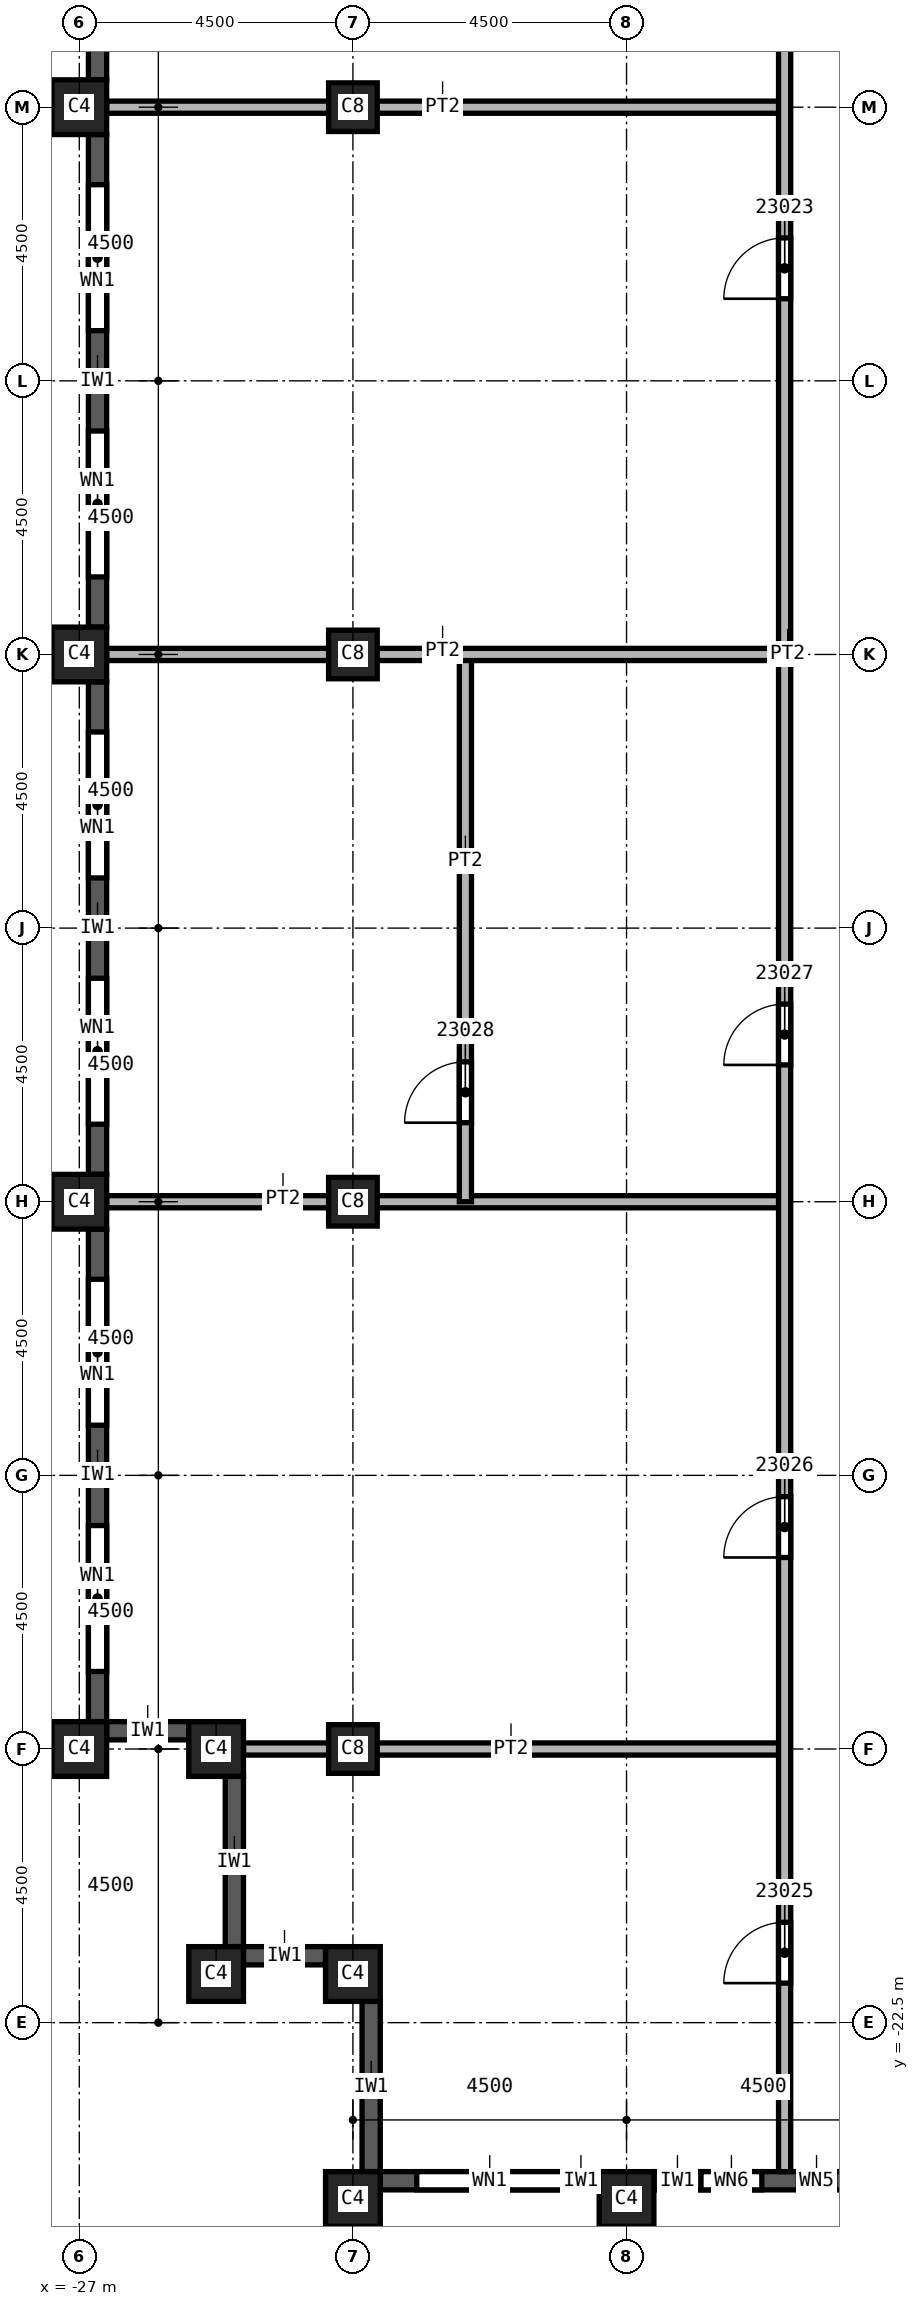
"""IFC4 building model, lengths in metres.
Left out: names, types, materials, properties, quantities, classifications, styles, units other than length and angle.
Written with IfcOpenShell. Run it as: python <this file> out.ifc"""

import sys

from ifc_helpers import new_model, si_unit, direction, frame, frame_2d, origin, origin_2d, place, context, subcontext, project, spatial, rectangle, extrude, element, fill, save


model = new_model("IFC4")
c1 = context("Model", 3, precision=1e-05, world=origin(), true_north=direction((0.0, 1.0)))
c2 = subcontext(c1, "Body", "Model", "MODEL_VIEW")
j1 = project(units=[si_unit("LENGTHUNIT", "METRE"), si_unit("PLANEANGLEUNIT", "RADIAN")], contexts=[c1])
p1 = place(None, origin())
s1 = spatial("IfcSite", under=j1, at=p1, CompositionType="ELEMENT")
p2 = place(p1, origin())
s2 = spatial("IfcBuilding", under=s1, at=p2, CompositionType="ELEMENT")
p3 = place(p2, frame((0.0, 0.0, 330.0)))
s3 = spatial("IfcBuildingStorey", under=s2, at=p3, CompositionType="ELEMENT", Elevation=330.0)
for number, where, z_axis, x_axis in (
    (1, (-22.5, 0.0, 0.0), (0.0, 0.0, 1.0), (1.0, 0.0, 0.0)),
    (2, (-22.5, 9.0, 0.0), (0.0, 0.0, 1.0), (1.0, 0.0, 0.0)),
    (3, (-22.5, -9.0, 0.0), (0.0, 0.0, 1.0), (1.0, 0.0, 0.0)),
    (4, (-22.5, -18.0, 0.0), (0.0, 0.0, 1.0), (1.0, 0.0, 0.0)),
):
    element("IfcColumn", number, at=place(p3, frame(where, z_axis=z_axis, x_axis=x_axis)), inside=s3, PredefinedType="COLUMN", context=c2, shape_type="SweptSolid", body=[
        extrude(rectangle(XDim=0.8, YDim=0.8, at=origin_2d()), origin(), (0.0, 0.0, 1.0), 3.74),
    ])
for number, where, z_axis, x_axis in (
    (5, (-18.0, -25.4, 0.0), (0.0, 0.0, 1.0), (1.0, 0.0, 0.0)),
    (6, (-22.5, -25.4, 0.0), (0.0, 0.0, 1.0), (1.0, 0.0, 0.0)),
    (7, (-27.0, 0.0, 0.0), (0.0, 0.0, 1.0), (0.0, 1.0, 0.0)),
    (8, (-27.0, 9.0, 0.0), (0.0, 0.0, 1.0), (0.0, 1.0, 0.0)),
    (9, (-27.0, -9.0, 0.0), (0.0, 0.0, 1.0), (0.0, 1.0, 0.0)),
    (10, (-27.0, -18.0, 0.0), (0.0, 0.0, 1.0), (0.0, 1.0, 0.0)),
    (11, (-22.5, -21.7, 0.0), (0.0, 0.0, 1.0), (1.0, 0.0, 0.0)),
    (12, (-24.75, -21.7, 0.0), (0.0, 0.0, 1.0), (1.0, 0.0, 0.0)),
    (13, (-24.75, -18.0, 0.0), (0.0, 0.0, 1.0), (1.0, 0.0, 0.0)),
):
    element("IfcColumn", number, at=place(p3, frame(where, z_axis=z_axis, x_axis=x_axis)), inside=s3, PredefinedType="COLUMN", context=c2, shape_type="SweptSolid", body=[
        extrude(rectangle(XDim=0.9, YDim=0.9, at=origin_2d()), origin(), (0.0, 0.0, 1.0), 3.74),
    ])
p4 = place(p3, frame((-26.7, 17.55, 0.0), z_axis=(0.0, 0.0, 1.0), x_axis=(0.0, -1.0, 0.0)))
e14 = element("IfcWall", 14, at=p4, inside=s3, PredefinedType="SOLIDWALL", context=c2, shape_type="SweptSolid", body=[
    extrude(rectangle(XDim=8.1, YDim=0.3, at=frame_2d((4.05, 0.0))), origin(), (0.0, 0.0, 1.0), 3.14),
])
p5 = place(p4, frame((0.825, 0.0, 0.8)))
e15 = element("IfcOpeningElement", 15, at=p5, cuts=e14, PredefinedType="OPENING", context=c2, shape_type="SweptSolid", body=[
    extrude(rectangle(XDim=2.4, YDim=1.95, at=frame_2d((1.2, 0.975))), frame((0.0, 0.15, 0.0), z_axis=(0.0, -1.0, 0.0), x_axis=(1.0, 0.0, 0.0)), (0.0, 0.0, 1.0), 0.3),
])
p6 = place(p4, frame((4.875, 0.0, 0.8)))
e16 = element("IfcOpeningElement", 16, at=p6, cuts=e14, PredefinedType="OPENING", context=c2, shape_type="SweptSolid", body=[
    extrude(rectangle(XDim=2.4, YDim=1.95, at=frame_2d((1.2, 0.975))), frame((0.0, 0.15, 0.0), z_axis=(0.0, -1.0, 0.0), x_axis=(1.0, 0.0, 0.0)), (0.0, 0.0, 1.0), 0.3),
])
p7 = place(p3, frame((-26.7, 8.55, 0.0), z_axis=(0.0, 0.0, 1.0), x_axis=(0.0, -1.0, 0.0)))
e17 = element("IfcWall", 17, at=p7, inside=s3, PredefinedType="SOLIDWALL", context=c2, shape_type="SweptSolid", body=[
    extrude(rectangle(XDim=8.1, YDim=0.3, at=frame_2d((4.05, 0.0))), origin(), (0.0, 0.0, 1.0), 3.14),
])
p8 = place(p7, frame((0.825, 0.0, 0.8)))
e18 = element("IfcOpeningElement", 18, at=p8, cuts=e17, PredefinedType="OPENING", context=c2, shape_type="SweptSolid", body=[
    extrude(rectangle(XDim=2.4, YDim=1.95, at=frame_2d((1.2, 0.975))), frame((0.0, 0.15, 0.0), z_axis=(0.0, -1.0, 0.0), x_axis=(1.0, 0.0, 0.0)), (0.0, 0.0, 1.0), 0.3),
])
p9 = place(p7, frame((4.875, 0.0, 0.8)))
e19 = element("IfcOpeningElement", 19, at=p9, cuts=e17, PredefinedType="OPENING", context=c2, shape_type="SweptSolid", body=[
    extrude(rectangle(XDim=2.4, YDim=1.95, at=frame_2d((1.2, 0.975))), frame((0.0, 0.15, 0.0), z_axis=(0.0, -1.0, 0.0), x_axis=(1.0, 0.0, 0.0)), (0.0, 0.0, 1.0), 0.3),
])
p10 = place(p3, frame((-26.7, -0.45, 0.0), z_axis=(0.0, 0.0, 1.0), x_axis=(0.0, -1.0, 0.0)))
e20 = element("IfcWall", 20, at=p10, inside=s3, PredefinedType="SOLIDWALL", context=c2, shape_type="SweptSolid", body=[
    extrude(rectangle(XDim=8.1, YDim=0.3, at=frame_2d((4.05, 0.0))), origin(), (0.0, 0.0, 1.0), 3.14),
])
p11 = place(p10, frame((0.825, 0.0, 0.8)))
e21 = element("IfcOpeningElement", 21, at=p11, cuts=e20, PredefinedType="OPENING", context=c2, shape_type="SweptSolid", body=[
    extrude(rectangle(XDim=2.4, YDim=1.95, at=frame_2d((1.2, 0.975))), frame((0.0, 0.15, 0.0), z_axis=(0.0, -1.0, 0.0), x_axis=(1.0, 0.0, 0.0)), (0.0, 0.0, 1.0), 0.3),
])
p12 = place(p10, frame((4.875, 0.0, 0.8)))
e22 = element("IfcOpeningElement", 22, at=p12, cuts=e20, PredefinedType="OPENING", context=c2, shape_type="SweptSolid", body=[
    extrude(rectangle(XDim=2.4, YDim=1.95, at=frame_2d((1.2, 0.975))), frame((0.0, 0.15, 0.0), z_axis=(0.0, -1.0, 0.0), x_axis=(1.0, 0.0, 0.0)), (0.0, 0.0, 1.0), 0.3),
])
p13 = place(p3, frame((-26.7, -9.45, 0.0), z_axis=(0.0, 0.0, 1.0), x_axis=(0.0, -1.0, 0.0)))
e23 = element("IfcWall", 23, at=p13, inside=s3, PredefinedType="SOLIDWALL", context=c2, shape_type="SweptSolid", body=[
    extrude(rectangle(XDim=8.1, YDim=0.3, at=frame_2d((4.05, 0.0))), origin(), (0.0, 0.0, 1.0), 3.14),
])
p14 = place(p13, frame((0.825, 0.0, 0.8)))
e24 = element("IfcOpeningElement", 24, at=p14, cuts=e23, PredefinedType="OPENING", context=c2, shape_type="SweptSolid", body=[
    extrude(rectangle(XDim=2.4, YDim=1.95, at=frame_2d((1.2, 0.975))), frame((0.0, 0.15, 0.0), z_axis=(0.0, -1.0, 0.0), x_axis=(1.0, 0.0, 0.0)), (0.0, 0.0, 1.0), 0.3),
])
p15 = place(p13, frame((4.875, 0.0, 0.8)))
e25 = element("IfcOpeningElement", 25, at=p15, cuts=e23, PredefinedType="OPENING", context=c2, shape_type="SweptSolid", body=[
    extrude(rectangle(XDim=2.4, YDim=1.95, at=frame_2d((1.2, 0.975))), frame((0.0, 0.15, 0.0), z_axis=(0.0, -1.0, 0.0), x_axis=(1.0, 0.0, 0.0)), (0.0, 0.0, 1.0), 0.3),
])
p16 = place(p3, frame((-26.55, -17.7, 0.0), z_axis=(0.0, 0.0, 1.0), x_axis=(1.0, 0.0, 0.0)))
e26 = element("IfcWall", 26, at=p16, inside=s3, PredefinedType="SOLIDWALL", context=c2, shape_type="SweptSolid", body=[
    extrude(rectangle(XDim=1.35, YDim=0.3, at=frame_2d((0.675, 0.0))), origin(), (0.0, 0.0, 1.0), 3.14),
])
p17 = place(p3, frame((-24.45, -18.45, 0.0), z_axis=(0.0, 0.0, 1.0), x_axis=(0.0, -1.0, 0.0)))
e27 = element("IfcWall", 27, at=p17, inside=s3, PredefinedType="SOLIDWALL", context=c2, shape_type="SweptSolid", body=[
    extrude(rectangle(XDim=2.8, YDim=0.3, at=frame_2d((1.4, 0.0))), origin(), (0.0, 0.0, 1.0), 3.14),
])
p18 = place(p3, frame((-24.3, -21.4, 0.0), z_axis=(0.0, 0.0, 1.0), x_axis=(1.0, 0.0, 0.0)))
e28 = element("IfcWall", 28, at=p18, inside=s3, PredefinedType="SOLIDWALL", context=c2, shape_type="SweptSolid", body=[
    extrude(rectangle(XDim=1.35, YDim=0.3, at=frame_2d((0.675, 0.0))), origin(), (0.0, 0.0, 1.0), 3.14),
])
p19 = place(p3, frame((-22.2, -22.15, 0.0), z_axis=(0.0, 0.0, 1.0), x_axis=(0.0, -1.0, 0.0)))
e29 = element("IfcWall", 29, at=p19, inside=s3, PredefinedType="SOLIDWALL", context=c2, shape_type="SweptSolid", body=[
    extrude(rectangle(XDim=2.8, YDim=0.3, at=frame_2d((1.4, 0.0))), origin(), (0.0, 0.0, 1.0), 3.14),
])
p20 = place(p3, frame((-22.05, -25.1, 0.0), z_axis=(0.0, 0.0, 1.0), x_axis=(1.0, 0.0, 0.0)))
e30 = element("IfcWall", 30, at=p20, inside=s3, PredefinedType="SOLIDWALL", context=c2, shape_type="SweptSolid", body=[
    extrude(rectangle(XDim=3.6, YDim=0.3, at=frame_2d((1.8, 0.0))), origin(), (0.0, 0.0, 1.0), 3.14),
])
p21 = place(p20, frame((0.6, 0.0, 0.8)))
e31 = element("IfcOpeningElement", 31, at=p21, cuts=e30, PredefinedType="OPENING", context=c2, shape_type="SweptSolid", body=[
    extrude(rectangle(XDim=2.4, YDim=1.95, at=frame_2d((1.2, 0.975))), frame((0.0, 0.15, 0.0), z_axis=(0.0, -1.0, 0.0), x_axis=(1.0, 0.0, 0.0)), (0.0, 0.0, 1.0), 0.3),
])
p22 = place(p3, frame((-17.55, -25.1, 0.0), z_axis=(0.0, 0.0, 1.0), x_axis=(1.0, 0.0, 0.0)))
e32 = element("IfcWall", 32, at=p22, inside=s3, PredefinedType="SOLIDWALL", context=c2, shape_type="SweptSolid", body=[
    extrude(rectangle(XDim=3.6, YDim=0.3, at=frame_2d((1.8, 0.0))), origin(), (0.0, 0.0, 1.0), 3.14),
])
p23 = place(p22, frame((0.775, 0.0, 0.8)))
e33 = element("IfcOpeningElement", 33, at=p23, cuts=e32, PredefinedType="OPENING", context=c2, shape_type="SweptSolid", body=[
    extrude(rectangle(XDim=1.0, YDim=1.95, at=frame_2d((0.5, 0.975))), frame((0.0, 0.15, 0.0), z_axis=(0.0, -1.0, 0.0), x_axis=(1.0, 0.0, 0.0)), (0.0, 0.0, 1.0), 0.3),
])
p24 = place(p22, frame((2.375, 0.0, 0.8)))
e34 = element("IfcOpeningElement", 34, at=p24, cuts=e32, PredefinedType="OPENING", context=c2, shape_type="SweptSolid", body=[
    extrude(rectangle(XDim=0.6, YDim=1.95, at=frame_2d((0.3, 0.975))), frame((0.0, 0.15, 0.0), z_axis=(0.0, -1.0, 0.0), x_axis=(1.0, 0.0, 0.0)), (0.0, 0.0, 1.0), 0.3),
])
for number, where, z_axis, x_axis in (
    (35, (-26.55, -9.0, 0.0), (0.0, 0.0, 1.0), (1.0, 0.0, 0.0)),
    (36, (-26.55, 9.0, 0.0), (0.0, 0.0, 1.0), (1.0, 0.0, 0.0)),
):
    element("IfcWall", number, at=place(p3, frame(where, z_axis=z_axis, x_axis=x_axis)), inside=s3, PredefinedType="PARTITIONING", context=c2, shape_type="SweptSolid", body=[
        extrude(rectangle(XDim=11.15, YDim=0.2, at=frame_2d((5.575, 0.0))), origin(), (0.0, 0.0, 1.0), 3.74),
    ])
p25 = place(p3, frame((-24.3, -18.0, 0.0), z_axis=(0.0, 0.0, 1.0), x_axis=(1.0, 0.0, 0.0)))
e37 = element("IfcWall", 37, at=p25, inside=s3, PredefinedType="PARTITIONING", context=c2, shape_type="SweptSolid", body=[
    extrude(rectangle(XDim=8.9, YDim=0.2, at=frame_2d((4.45, 0.0))), origin(), (0.0, 0.0, 1.0), 3.74),
])
p26 = place(p3, frame((-20.65, -9.0, 0.0), z_axis=(0.0, 0.0, 1.0), x_axis=(0.0, 1.0, 0.0)))
e38 = element("IfcWall", 38, at=p26, inside=s3, PredefinedType="PARTITIONING", context=c2, shape_type="SweptSolid", body=[
    extrude(rectangle(XDim=9.0, YDim=0.2, at=frame_2d((4.5, 0.0))), origin(), (0.0, 0.0, 1.0), 3.74),
])
p27 = place(p26, frame((1.3, 0.0, 0.0)))
e39 = element("IfcOpeningElement", 39, at=p27, cuts=e38, PredefinedType="OPENING", context=c2, shape_type="SweptSolid", body=[
    extrude(rectangle(XDim=1.0, YDim=2.1, at=frame_2d((0.5, 1.05))), frame((0.0, 0.1, 0.0), z_axis=(0.0, -1.0, 0.0), x_axis=(1.0, 0.0, 0.0)), (0.0, 0.0, 1.0), 0.2),
])
p28 = place(p3, frame((-15.4, 0.0, 0.0), z_axis=(0.0, 0.0, 1.0), x_axis=(-1.0, 0.0, 0.0)))
e40 = element("IfcWall", 40, at=p28, inside=s3, PredefinedType="PARTITIONING", context=c2, shape_type="SweptSolid", body=[
    extrude(rectangle(XDim=11.15, YDim=0.2, at=frame_2d((5.575, 0.0))), origin(), (0.0, 0.0, 1.0), 3.74),
])
p29 = place(p3, frame((-15.4, -24.95, 0.0), z_axis=(0.0, 0.0, 1.0), x_axis=(0.0, 1.0, 0.0)))
e41 = element("IfcWall", 41, at=p29, inside=s3, PredefinedType="PARTITIONING", context=c2, shape_type="SweptSolid", body=[
    extrude(rectangle(XDim=38.55, YDim=0.2, at=frame_2d((19.275, 0.0))), origin(), (0.0, 0.0, 1.0), 3.74),
])
p30 = place(p29, frame((30.8, 0.0, 0.0)))
e42 = element("IfcOpeningElement", 42, at=p30, cuts=e41, PredefinedType="OPENING", context=c2, shape_type="SweptSolid", body=[
    extrude(rectangle(XDim=1.0, YDim=2.1, at=frame_2d((0.5, 1.05))), frame((0.0, 0.1, 0.0), z_axis=(0.0, -1.0, 0.0), x_axis=(1.0, 0.0, 0.0)), (0.0, 0.0, 1.0), 0.2),
])
p31 = place(p29, frame((3.1, 0.0, 0.0)))
e43 = element("IfcOpeningElement", 43, at=p31, cuts=e41, PredefinedType="OPENING", context=c2, shape_type="SweptSolid", body=[
    extrude(rectangle(XDim=1.0, YDim=2.1, at=frame_2d((0.5, 1.05))), frame((0.0, 0.1, 0.0), z_axis=(0.0, -1.0, 0.0), x_axis=(1.0, 0.0, 0.0)), (0.0, 0.0, 1.0), 0.2),
])
p32 = place(p29, frame((10.1, 0.0, 0.0)))
e44 = element("IfcOpeningElement", 44, at=p32, cuts=e41, PredefinedType="OPENING", context=c2, shape_type="SweptSolid", body=[
    extrude(rectangle(XDim=1.0, YDim=2.1, at=frame_2d((0.5, 1.05))), frame((0.0, 0.1, 0.0), z_axis=(0.0, -1.0, 0.0), x_axis=(1.0, 0.0, 0.0)), (0.0, 0.0, 1.0), 0.2),
])
p33 = place(p29, frame((18.2, 0.0, 0.0)))
e45 = element("IfcOpeningElement", 45, at=p33, cuts=e41, PredefinedType="OPENING", context=c2, shape_type="SweptSolid", body=[
    extrude(rectangle(XDim=1.0, YDim=2.1, at=frame_2d((0.5, 1.05))), frame((0.0, 0.1, 0.0), z_axis=(0.0, -1.0, 0.0), x_axis=(1.0, 0.0, 0.0)), (0.0, 0.0, 1.0), 0.2),
])
p34 = place(p8, origin())
e46 = element("IfcWindow", 46, at=p34, inside=s3, PartitioningType="SINGLE_PANEL", PredefinedType="WINDOW", context=c2, shape_type="SweptSolid", body=[
    extrude(rectangle(XDim=2.4, YDim=1.95, at=frame_2d((1.2, 0.975))), frame((0.0, 0.03, 0.0), z_axis=(0.0, -1.0, 0.0), x_axis=(1.0, 0.0, 0.0)), (0.0, 0.0, 1.0), 0.06),
])
fill(e18, e46)
p35 = place(p9, origin())
e47 = element("IfcWindow", 47, at=p35, inside=s3, PartitioningType="SINGLE_PANEL", PredefinedType="WINDOW", context=c2, shape_type="SweptSolid", body=[
    extrude(rectangle(XDim=2.4, YDim=1.95, at=frame_2d((1.2, 0.975))), frame((0.0, 0.03, 0.0), z_axis=(0.0, -1.0, 0.0), x_axis=(1.0, 0.0, 0.0)), (0.0, 0.0, 1.0), 0.06),
])
fill(e19, e47)
p36 = place(p11, origin())
e48 = element("IfcWindow", 48, at=p36, inside=s3, PartitioningType="SINGLE_PANEL", PredefinedType="WINDOW", context=c2, shape_type="SweptSolid", body=[
    extrude(rectangle(XDim=2.4, YDim=1.95, at=frame_2d((1.2, 0.975))), frame((0.0, 0.03, 0.0), z_axis=(0.0, -1.0, 0.0), x_axis=(1.0, 0.0, 0.0)), (0.0, 0.0, 1.0), 0.06),
])
fill(e21, e48)
p37 = place(p12, origin())
e49 = element("IfcWindow", 49, at=p37, inside=s3, PartitioningType="SINGLE_PANEL", PredefinedType="WINDOW", context=c2, shape_type="SweptSolid", body=[
    extrude(rectangle(XDim=2.4, YDim=1.95, at=frame_2d((1.2, 0.975))), frame((0.0, 0.03, 0.0), z_axis=(0.0, -1.0, 0.0), x_axis=(1.0, 0.0, 0.0)), (0.0, 0.0, 1.0), 0.06),
])
fill(e22, e49)
p38 = place(p14, origin())
e50 = element("IfcWindow", 50, at=p38, inside=s3, PartitioningType="SINGLE_PANEL", PredefinedType="WINDOW", context=c2, shape_type="SweptSolid", body=[
    extrude(rectangle(XDim=2.4, YDim=1.95, at=frame_2d((1.2, 0.975))), frame((0.0, 0.03, 0.0), z_axis=(0.0, -1.0, 0.0), x_axis=(1.0, 0.0, 0.0)), (0.0, 0.0, 1.0), 0.06),
])
fill(e24, e50)
p39 = place(p15, origin())
e51 = element("IfcWindow", 51, at=p39, inside=s3, PartitioningType="SINGLE_PANEL", PredefinedType="WINDOW", context=c2, shape_type="SweptSolid", body=[
    extrude(rectangle(XDim=2.4, YDim=1.95, at=frame_2d((1.2, 0.975))), frame((0.0, 0.03, 0.0), z_axis=(0.0, -1.0, 0.0), x_axis=(1.0, 0.0, 0.0)), (0.0, 0.0, 1.0), 0.06),
])
fill(e25, e51)
p40 = place(p21, origin())
e52 = element("IfcWindow", 52, at=p40, inside=s3, PartitioningType="SINGLE_PANEL", PredefinedType="WINDOW", context=c2, shape_type="SweptSolid", body=[
    extrude(rectangle(XDim=2.4, YDim=1.95, at=frame_2d((1.2, 0.975))), frame((0.0, 0.03, 0.0), z_axis=(0.0, -1.0, 0.0), x_axis=(1.0, 0.0, 0.0)), (0.0, 0.0, 1.0), 0.06),
])
fill(e31, e52)
p41 = place(p30, origin())
e53 = element("IfcDoor", 53, at=p41, inside=s3, OperationType="SINGLE_SWING_RIGHT", PredefinedType="DOOR", context=c2, shape_type="SweptSolid", body=[
    extrude(rectangle(XDim=1.0, YDim=2.1, at=frame_2d((0.5, 1.05))), frame((0.0, 0.025, 0.0), z_axis=(0.0, -1.0, 0.0), x_axis=(1.0, 0.0, 0.0)), (0.0, 0.0, 1.0), 0.05),
])
fill(e42, e53)
p42 = place(p31, origin())
e54 = element("IfcDoor", 54, at=p42, inside=s3, OperationType="SINGLE_SWING_RIGHT", PredefinedType="DOOR", context=c2, shape_type="SweptSolid", body=[
    extrude(rectangle(XDim=1.0, YDim=2.1, at=frame_2d((0.5, 1.05))), frame((0.0, 0.025, 0.0), z_axis=(0.0, -1.0, 0.0), x_axis=(1.0, 0.0, 0.0)), (0.0, 0.0, 1.0), 0.05),
])
fill(e43, e54)
p43 = place(p32, origin())
e55 = element("IfcDoor", 55, at=p43, inside=s3, OperationType="SINGLE_SWING_LEFT", PredefinedType="DOOR", context=c2, shape_type="SweptSolid", body=[
    extrude(rectangle(XDim=1.0, YDim=2.1, at=frame_2d((0.5, 1.05))), frame((0.0, 0.025, 0.0), z_axis=(0.0, -1.0, 0.0), x_axis=(1.0, 0.0, 0.0)), (0.0, 0.0, 1.0), 0.05),
])
fill(e44, e55)
p44 = place(p33, origin())
e56 = element("IfcDoor", 56, at=p44, inside=s3, OperationType="SINGLE_SWING_RIGHT", PredefinedType="DOOR", context=c2, shape_type="SweptSolid", body=[
    extrude(rectangle(XDim=1.0, YDim=2.1, at=frame_2d((0.5, 1.05))), frame((0.0, 0.025, 0.0), z_axis=(0.0, -1.0, 0.0), x_axis=(1.0, 0.0, 0.0)), (0.0, 0.0, 1.0), 0.05),
])
fill(e45, e56)
p45 = place(p27, origin())
e57 = element("IfcDoor", 57, at=p45, inside=s3, OperationType="SINGLE_SWING_LEFT", PredefinedType="DOOR", context=c2, shape_type="SweptSolid", body=[
    extrude(rectangle(XDim=1.0, YDim=2.1, at=frame_2d((0.5, 1.05))), frame((0.0, 0.025, 0.0), z_axis=(0.0, -1.0, 0.0), x_axis=(1.0, 0.0, 0.0)), (0.0, 0.0, 1.0), 0.05),
])
fill(e39, e57)
p46 = place(p23, origin())
e58 = element("IfcWindow", 58, at=p46, inside=s3, PartitioningType="SINGLE_PANEL", PredefinedType="WINDOW", context=c2, shape_type="SweptSolid", body=[
    extrude(rectangle(XDim=1.0, YDim=1.95, at=frame_2d((0.5, 0.975))), frame((0.0, 0.03, 0.0), z_axis=(0.0, -1.0, 0.0), x_axis=(1.0, 0.0, 0.0)), (0.0, 0.0, 1.0), 0.06),
])
fill(e33, e58)
p47 = place(p24, origin())
e59 = element("IfcWindow", 59, at=p47, inside=s3, PartitioningType="SINGLE_PANEL", PredefinedType="WINDOW", context=c2, shape_type="SweptSolid", body=[
    extrude(rectangle(XDim=0.6, YDim=1.95, at=frame_2d((0.3, 0.975))), frame((0.0, 0.03, 0.0), z_axis=(0.0, -1.0, 0.0), x_axis=(1.0, 0.0, 0.0)), (0.0, 0.0, 1.0), 0.06),
])
fill(e34, e59)
save(model, sys.argv[1])
